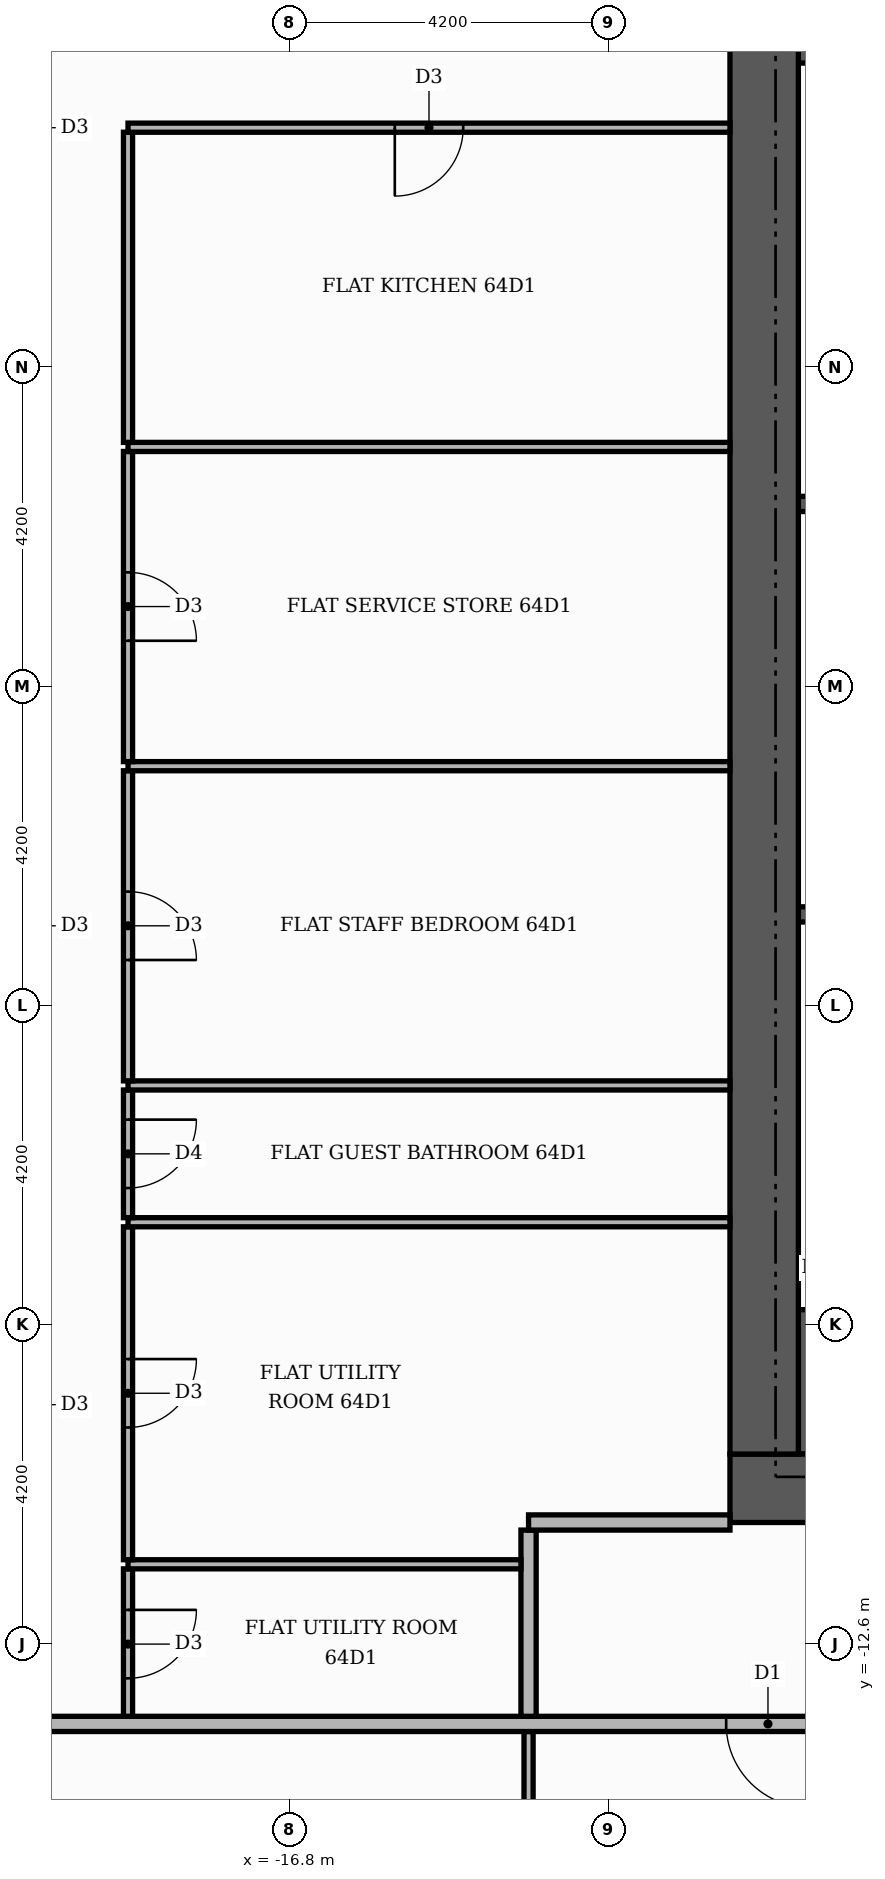
"""IFC4 building model, lengths in metres.
Left out: names, types, materials, properties, quantities, classifications, styles, units other than length and angle.
Written with IfcOpenShell. Run it as: python <this file> out.ifc"""

import sys

from ifc_helpers import new_model, si_unit, direction, frame, frame_2d, origin, place, context, subcontext, project, spatial, rectangle, extrude, element, fill, save


model = new_model("IFC4")
c1 = context("Model", 3, precision=1e-05, world=origin(), true_north=direction((0.0, 1.0)))
c2 = subcontext(c1, "Body", "Model", "MODEL_VIEW")
j1 = project(units=[si_unit("LENGTHUNIT", "METRE"), si_unit("PLANEANGLEUNIT", "RADIAN")], contexts=[c1])
p1 = place(None, origin())
s1 = spatial("IfcSite", under=j1, at=p1, CompositionType="ELEMENT")
p2 = place(p1, origin())
s2 = spatial("IfcBuilding", under=s1, at=p2, CompositionType="ELEMENT")
p3 = place(p2, frame((0.0, 0.0, 267.9)))
s3 = spatial("IfcBuildingStorey", under=s2, at=p3, CompositionType="ELEMENT", Elevation=267.9)
for number, where, z_axis, x_axis in (
    (1, (-10.1, -9.15, 0.0), (0.0, 0.0, 1.0), (1.0, 0.0, 0.0)),
    (2, (-10.1, 9.15, 0.0), (0.0, 0.0, 1.0), (1.0, 0.0, 0.0)),
):
    element("IfcWall", number, at=place(p3, frame(where, z_axis=z_axis, x_axis=x_axis)), inside=s3, PredefinedType="SHEAR", context=c2, shape_type="SweptSolid", body=[
        extrude(rectangle(XDim=4.6, YDim=1.9, at=frame_2d((2.3, 0.0))), origin(), (0.0, 0.0, 1.0), 3.48),
    ])
for number, where, z_axis, x_axis in (
    (3, (-10.1, -3.0, 0.0), (0.0, 0.0, 1.0), (1.0, 0.0, 0.0)),
    (4, (-10.1, 2.4, 0.0), (0.0, 0.0, 1.0), (1.0, 0.0, 0.0)),
):
    element("IfcWall", number, at=place(p3, frame(where, z_axis=z_axis, x_axis=x_axis)), inside=s3, PredefinedType="SHEAR", context=c2, shape_type="SweptSolid", body=[
        extrude(rectangle(XDim=0.9, YDim=0.2, at=frame_2d((0.45, 0.0))), origin(), (0.0, 0.0, 1.0), 3.48),
    ])
p4 = place(p3, frame((-11.0, -10.55, 0.0), z_axis=(0.0, 0.0, 1.0), x_axis=(1.0, 0.0, 0.0)))
e5 = element("IfcWall", 5, at=p4, inside=s3, PredefinedType="SHEAR", context=c2, shape_type="SweptSolid", body=[
    extrude(rectangle(XDim=22.0, YDim=0.9, at=frame_2d((11.0, 0.0))), origin(), (0.0, 0.0, 1.0), 3.48),
])
p5 = place(p4, frame((7.4, 0.0, 0.0)))
e6 = element("IfcOpeningElement", 6, at=p5, cuts=e5, PredefinedType="OPENING", context=c2, shape_type="SweptSolid", body=[
    extrude(rectangle(XDim=1.8, YDim=2.2, at=frame_2d((0.9, 1.1))), frame((0.0, 0.46, 0.0), z_axis=(0.0, -1.0, 0.0), x_axis=(1.0, 0.0, 0.0)), (0.0, 0.0, 1.0), 0.92),
])
p6 = place(p3, frame((-10.55, -10.1, 0.0), z_axis=(0.0, 0.0, 1.0), x_axis=(0.0, 1.0, 0.0)))
e7 = element("IfcWall", 7, at=p6, inside=s3, PredefinedType="SHEAR", context=c2, shape_type="SweptSolid", body=[
    extrude(rectangle(XDim=20.2, YDim=0.9, at=frame_2d((10.1, 0.0))), origin(), (0.0, 0.0, 1.0), 3.48),
])
p7 = place(p3, frame((-13.65, -20.06, 0.0), z_axis=(0.0, 0.0, 1.0), x_axis=(0.0, 1.0, 0.0)))
e8 = element("IfcWall", 8, at=p7, inside=s3, PredefinedType="PARTITIONING", context=c2, shape_type="SweptSolid", body=[
    extrude(rectangle(XDim=6.31, YDim=0.12, at=frame_2d((3.155, 0.0))), origin(), (0.0, 0.0, 1.0), 3.48),
])
p8 = place(p7, frame((2.675, 0.0, 0.0)))
e9 = element("IfcOpeningElement", 9, at=p8, cuts=e8, PredefinedType="OPENING", context=c2, shape_type="SweptSolid", body=[
    extrude(rectangle(XDim=1.0, YDim=2.1, at=frame_2d((0.5, 1.05))), frame((0.0, 0.07, 0.0), z_axis=(0.0, -1.0, 0.0), x_axis=(1.0, 0.0, 0.0)), (0.0, 0.0, 1.0), 0.14),
])
p9 = place(p3, frame((-25.42, -13.65, 0.0), z_axis=(0.0, 0.0, 1.0), x_axis=(1.0, 0.0, 0.0)))
e10 = element("IfcWall", 10, at=p9, inside=s3, PredefinedType="PARTITIONING", context=c2, shape_type="SweptSolid", body=[
    extrude(rectangle(XDim=39.07, YDim=0.2, at=frame_2d((19.535, 0.0))), origin(), (0.0, 0.0, 1.0), 3.48),
])
p10 = place(p9, frame((14.37, 0.0, 0.0)))
e11 = element("IfcOpeningElement", 11, at=p10, cuts=e10, PredefinedType="OPENING", context=c2, shape_type="SweptSolid", body=[
    extrude(rectangle(XDim=1.1, YDim=2.4, at=frame_2d((0.55, 1.2))), frame((0.0, 0.11, 0.0), z_axis=(0.0, -1.0, 0.0), x_axis=(1.0, 0.0, 0.0)), (0.0, 0.0, 1.0), 0.22),
])
p11 = place(p3, frame((-18.92, -13.55, 0.0), z_axis=(0.0, 0.0, 1.0), x_axis=(0.0, 1.0, 0.0)))
e12 = element("IfcWall", 12, at=p11, inside=s3, PredefinedType="PARTITIONING", context=c2, shape_type="SweptSolid", body=[
    extrude(rectangle(XDim=1.94, YDim=0.12, at=frame_2d((0.97, 0.0))), origin(), (0.0, 0.0, 1.0), 3.48),
])
p12 = place(p11, frame((0.5, 0.0, 0.0)))
e13 = element("IfcOpeningElement", 13, at=p12, cuts=e12, PredefinedType="OPENING", context=c2, shape_type="SweptSolid", body=[
    extrude(rectangle(XDim=0.9, YDim=2.1, at=frame_2d((0.45, 1.05))), frame((0.0, 0.07, 0.0), z_axis=(0.0, -1.0, 0.0), x_axis=(1.0, 0.0, 0.0)), (0.0, 0.0, 1.0), 0.14),
])
p13 = place(p3, frame((-13.65, -13.55, 0.0), z_axis=(0.0, 0.0, 1.0), x_axis=(0.0, 1.0, 0.0)))
e14 = element("IfcWall", 14, at=p13, inside=s3, PredefinedType="PARTITIONING", context=c2, shape_type="SweptSolid", body=[
    extrude(rectangle(XDim=2.45, YDim=0.2, at=frame_2d((1.225, 0.0))), origin(), (0.0, 0.0, 1.0), 3.48),
])
p14 = place(p3, frame((-18.92, -11.55, 0.0), z_axis=(0.0, 0.0, 1.0), x_axis=(1.0, 0.0, 0.0)))
e15 = element("IfcWall", 15, at=p14, inside=s3, PredefinedType="PARTITIONING", context=c2, shape_type="SweptSolid", body=[
    extrude(rectangle(XDim=5.17, YDim=0.12, at=frame_2d((2.585, 0.0))), origin(), (0.0, 0.0, 1.0), 3.48),
])
p15 = place(p3, frame((-18.92, -11.49, 0.0), z_axis=(0.0, 0.0, 1.0), x_axis=(0.0, 1.0, 0.0)))
e16 = element("IfcWall", 16, at=p15, inside=s3, PredefinedType="PARTITIONING", context=c2, shape_type="SweptSolid", body=[
    extrude(rectangle(XDim=4.38, YDim=0.12, at=frame_2d((2.19, 0.0))), origin(), (0.0, 0.0, 1.0), 3.48),
])
p16 = place(p15, frame((1.74, 0.0, 0.0)))
e17 = element("IfcOpeningElement", 17, at=p16, cuts=e16, PredefinedType="OPENING", context=c2, shape_type="SweptSolid", body=[
    extrude(rectangle(XDim=0.9, YDim=2.1, at=frame_2d((0.45, 1.05))), frame((0.0, 0.07, 0.0), z_axis=(0.0, -1.0, 0.0), x_axis=(1.0, 0.0, 0.0)), (0.0, 0.0, 1.0), 0.14),
])
p17 = place(p3, frame((-13.65, -11.0, 0.0), z_axis=(0.0, 0.0, 1.0), x_axis=(1.0, 0.0, 0.0)))
e18 = element("IfcWall", 18, at=p17, inside=s3, PredefinedType="PARTITIONING", context=c2, shape_type="SweptSolid", body=[
    extrude(rectangle(XDim=2.65, YDim=0.2, at=frame_2d((1.325, 0.0))), origin(), (0.0, 0.0, 1.0), 3.48),
])
p18 = place(p3, frame((-18.92, -7.05, 0.0), z_axis=(0.0, 0.0, 1.0), x_axis=(1.0, 0.0, 0.0)))
e19 = element("IfcWall", 19, at=p18, inside=s3, PredefinedType="PARTITIONING", context=c2, shape_type="SweptSolid", body=[
    extrude(rectangle(XDim=7.92, YDim=0.12, at=frame_2d((3.96, 0.0))), origin(), (0.0, 0.0, 1.0), 3.48),
])
p19 = place(p3, frame((-18.92, -6.99, 0.0), z_axis=(0.0, 0.0, 1.0), x_axis=(0.0, 1.0, 0.0)))
e20 = element("IfcWall", 20, at=p19, inside=s3, PredefinedType="PARTITIONING", context=c2, shape_type="SweptSolid", body=[
    extrude(rectangle(XDim=1.68, YDim=0.12, at=frame_2d((0.84, 0.0))), origin(), (0.0, 0.0, 1.0), 3.48),
])
p20 = place(p19, frame((0.39, 0.0, 0.0)))
e21 = element("IfcOpeningElement", 21, at=p20, cuts=e20, PredefinedType="OPENING", context=c2, shape_type="SweptSolid", body=[
    extrude(rectangle(XDim=0.9, YDim=2.1, at=frame_2d((0.45, 1.05))), frame((0.0, 0.07, 0.0), z_axis=(0.0, -1.0, 0.0), x_axis=(1.0, 0.0, 0.0)), (0.0, 0.0, 1.0), 0.14),
])
p21 = place(p3, frame((-18.92, -5.25, 0.0), z_axis=(0.0, 0.0, 1.0), x_axis=(1.0, 0.0, 0.0)))
e22 = element("IfcWall", 22, at=p21, inside=s3, PredefinedType="PARTITIONING", context=c2, shape_type="SweptSolid", body=[
    extrude(rectangle(XDim=7.92, YDim=0.12, at=frame_2d((3.96, 0.0))), origin(), (0.0, 0.0, 1.0), 3.48),
])
p22 = place(p3, frame((-18.92, -5.19, 0.0), z_axis=(0.0, 0.0, 1.0), x_axis=(0.0, 1.0, 0.0)))
e23 = element("IfcWall", 23, at=p22, inside=s3, PredefinedType="PARTITIONING", context=c2, shape_type="SweptSolid", body=[
    extrude(rectangle(XDim=4.08, YDim=0.12, at=frame_2d((2.04, 0.0))), origin(), (0.0, 0.0, 1.0), 3.48),
])
p23 = place(p22, frame((1.59, 0.0, 0.0)))
e24 = element("IfcOpeningElement", 24, at=p23, cuts=e23, PredefinedType="OPENING", context=c2, shape_type="SweptSolid", body=[
    extrude(rectangle(XDim=0.9, YDim=2.1, at=frame_2d((0.45, 1.05))), frame((0.0, 0.07, 0.0), z_axis=(0.0, -1.0, 0.0), x_axis=(1.0, 0.0, 0.0)), (0.0, 0.0, 1.0), 0.14),
])
p24 = place(p3, frame((-18.92, -1.05, 0.0), z_axis=(0.0, 0.0, 1.0), x_axis=(1.0, 0.0, 0.0)))
e25 = element("IfcWall", 25, at=p24, inside=s3, PredefinedType="PARTITIONING", context=c2, shape_type="SweptSolid", body=[
    extrude(rectangle(XDim=7.92, YDim=0.12, at=frame_2d((3.96, 0.0))), origin(), (0.0, 0.0, 1.0), 3.48),
])
p25 = place(p3, frame((-18.92, -0.99, 0.0), z_axis=(0.0, 0.0, 1.0), x_axis=(0.0, 1.0, 0.0)))
e26 = element("IfcWall", 26, at=p25, inside=s3, PredefinedType="PARTITIONING", context=c2, shape_type="SweptSolid", body=[
    extrude(rectangle(XDim=4.08, YDim=0.12, at=frame_2d((2.04, 0.0))), origin(), (0.0, 0.0, 1.0), 3.48),
])
p26 = place(p25, frame((1.59, 0.0, 0.0)))
e27 = element("IfcOpeningElement", 27, at=p26, cuts=e26, PredefinedType="OPENING", context=c2, shape_type="SweptSolid", body=[
    extrude(rectangle(XDim=0.9, YDim=2.1, at=frame_2d((0.45, 1.05))), frame((0.0, 0.07, 0.0), z_axis=(0.0, -1.0, 0.0), x_axis=(1.0, 0.0, 0.0)), (0.0, 0.0, 1.0), 0.14),
])
p27 = place(p3, frame((-18.92, 3.15, 0.0), z_axis=(0.0, 0.0, 1.0), x_axis=(1.0, 0.0, 0.0)))
e28 = element("IfcWall", 28, at=p27, inside=s3, PredefinedType="PARTITIONING", context=c2, shape_type="SweptSolid", body=[
    extrude(rectangle(XDim=7.92, YDim=0.12, at=frame_2d((3.96, 0.0))), origin(), (0.0, 0.0, 1.0), 3.48),
])
p28 = place(p3, frame((-18.92, 3.21, 0.0), z_axis=(0.0, 0.0, 1.0), x_axis=(0.0, 1.0, 0.0)))
e29 = element("IfcWall", 29, at=p28, inside=s3, PredefinedType="PARTITIONING", context=c2, shape_type="SweptSolid", body=[
    extrude(rectangle(XDim=4.08, YDim=0.12, at=frame_2d((2.04, 0.0))), origin(), (0.0, 0.0, 1.0), 3.48),
])
p29 = place(p3, frame((-18.92, 7.35, 0.0), z_axis=(0.0, 0.0, 1.0), x_axis=(1.0, 0.0, 0.0)))
e30 = element("IfcWall", 30, at=p29, inside=s3, PredefinedType="PARTITIONING", context=c2, shape_type="SweptSolid", body=[
    extrude(rectangle(XDim=7.92, YDim=0.12, at=frame_2d((3.96, 0.0))), origin(), (0.0, 0.0, 1.0), 3.48),
])
p30 = place(p29, frame((3.51, 0.0, 0.0)))
e31 = element("IfcOpeningElement", 31, at=p30, cuts=e30, PredefinedType="OPENING", context=c2, shape_type="SweptSolid", body=[
    extrude(rectangle(XDim=0.9, YDim=2.1, at=frame_2d((0.45, 1.05))), frame((0.0, 0.07, 0.0), z_axis=(0.0, -1.0, 0.0), x_axis=(1.0, 0.0, 0.0)), (0.0, 0.0, 1.0), 0.14),
])
p31 = place(p10, frame((1.1, 0.0, 0.0), z_axis=(0.0, 0.0, 1.0), x_axis=(-1.0, 0.0, 0.0)))
e32 = element("IfcDoor", 32, at=p31, inside=s3, OperationType="SINGLE_SWING_RIGHT", PredefinedType="DOOR", context=c2, shape_type="SweptSolid", body=[
    extrude(rectangle(XDim=1.1, YDim=2.4, at=frame_2d((0.55, 1.2))), frame((0.0, 0.025, 0.0), z_axis=(0.0, -1.0, 0.0), x_axis=(1.0, 0.0, 0.0)), (0.0, 0.0, 1.0), 0.05),
])
fill(e11, e32)
p32 = place(p30, frame((0.9, 0.0, 0.0), z_axis=(0.0, 0.0, 1.0), x_axis=(-1.0, 0.0, 0.0)))
e33 = element("IfcDoor", 33, at=p32, inside=s3, OperationType="SINGLE_SWING_LEFT", PredefinedType="DOOR", context=c2, shape_type="SweptSolid", body=[
    extrude(rectangle(XDim=0.9, YDim=2.1, at=frame_2d((0.45, 1.05))), frame((0.0, 0.025, 0.0), z_axis=(0.0, -1.0, 0.0), x_axis=(1.0, 0.0, 0.0)), (0.0, 0.0, 1.0), 0.05),
])
fill(e31, e33)
p33 = place(p26, frame((0.9, 0.0, 0.0), z_axis=(0.0, 0.0, 1.0), x_axis=(-1.0, 0.0, 0.0)))
e34 = element("IfcDoor", 34, at=p33, inside=s3, OperationType="SINGLE_SWING_LEFT", PredefinedType="DOOR", context=c2, shape_type="SweptSolid", body=[
    extrude(rectangle(XDim=0.9, YDim=2.1, at=frame_2d((0.45, 1.05))), frame((0.0, 0.025, 0.0), z_axis=(0.0, -1.0, 0.0), x_axis=(1.0, 0.0, 0.0)), (0.0, 0.0, 1.0), 0.05),
])
fill(e27, e34)
p34 = place(p23, frame((0.9, 0.0, 0.0), z_axis=(0.0, 0.0, 1.0), x_axis=(-1.0, 0.0, 0.0)))
e35 = element("IfcDoor", 35, at=p34, inside=s3, OperationType="SINGLE_SWING_LEFT", PredefinedType="DOOR", context=c2, shape_type="SweptSolid", body=[
    extrude(rectangle(XDim=0.9, YDim=2.1, at=frame_2d((0.45, 1.05))), frame((0.0, 0.025, 0.0), z_axis=(0.0, -1.0, 0.0), x_axis=(1.0, 0.0, 0.0)), (0.0, 0.0, 1.0), 0.05),
])
fill(e24, e35)
p35 = place(p20, frame((0.9, 0.0, 0.0), z_axis=(0.0, 0.0, 1.0), x_axis=(-1.0, 0.0, 0.0)))
e36 = element("IfcDoor", 36, at=p35, inside=s3, OperationType="SINGLE_SWING_RIGHT", PredefinedType="DOOR", context=c2, shape_type="SweptSolid", body=[
    extrude(rectangle(XDim=0.9, YDim=2.1, at=frame_2d((0.45, 1.05))), frame((0.0, 0.025, 0.0), z_axis=(0.0, -1.0, 0.0), x_axis=(1.0, 0.0, 0.0)), (0.0, 0.0, 1.0), 0.05),
])
fill(e21, e36)
p36 = place(p16, frame((0.9, 0.0, 0.0), z_axis=(0.0, 0.0, 1.0), x_axis=(-1.0, 0.0, 0.0)))
e37 = element("IfcDoor", 37, at=p36, inside=s3, OperationType="SINGLE_SWING_RIGHT", PredefinedType="DOOR", context=c2, shape_type="SweptSolid", body=[
    extrude(rectangle(XDim=0.9, YDim=2.1, at=frame_2d((0.45, 1.05))), frame((0.0, 0.025, 0.0), z_axis=(0.0, -1.0, 0.0), x_axis=(1.0, 0.0, 0.0)), (0.0, 0.0, 1.0), 0.05),
])
fill(e17, e37)
p37 = place(p12, frame((0.9, 0.0, 0.0), z_axis=(0.0, 0.0, 1.0), x_axis=(-1.0, 0.0, 0.0)))
e38 = element("IfcDoor", 38, at=p37, inside=s3, OperationType="SINGLE_SWING_RIGHT", PredefinedType="DOOR", context=c2, shape_type="SweptSolid", body=[
    extrude(rectangle(XDim=0.9, YDim=2.1, at=frame_2d((0.45, 1.05))), frame((0.0, 0.025, 0.0), z_axis=(0.0, -1.0, 0.0), x_axis=(1.0, 0.0, 0.0)), (0.0, 0.0, 1.0), 0.05),
])
fill(e13, e38)
save(model, sys.argv[1])
